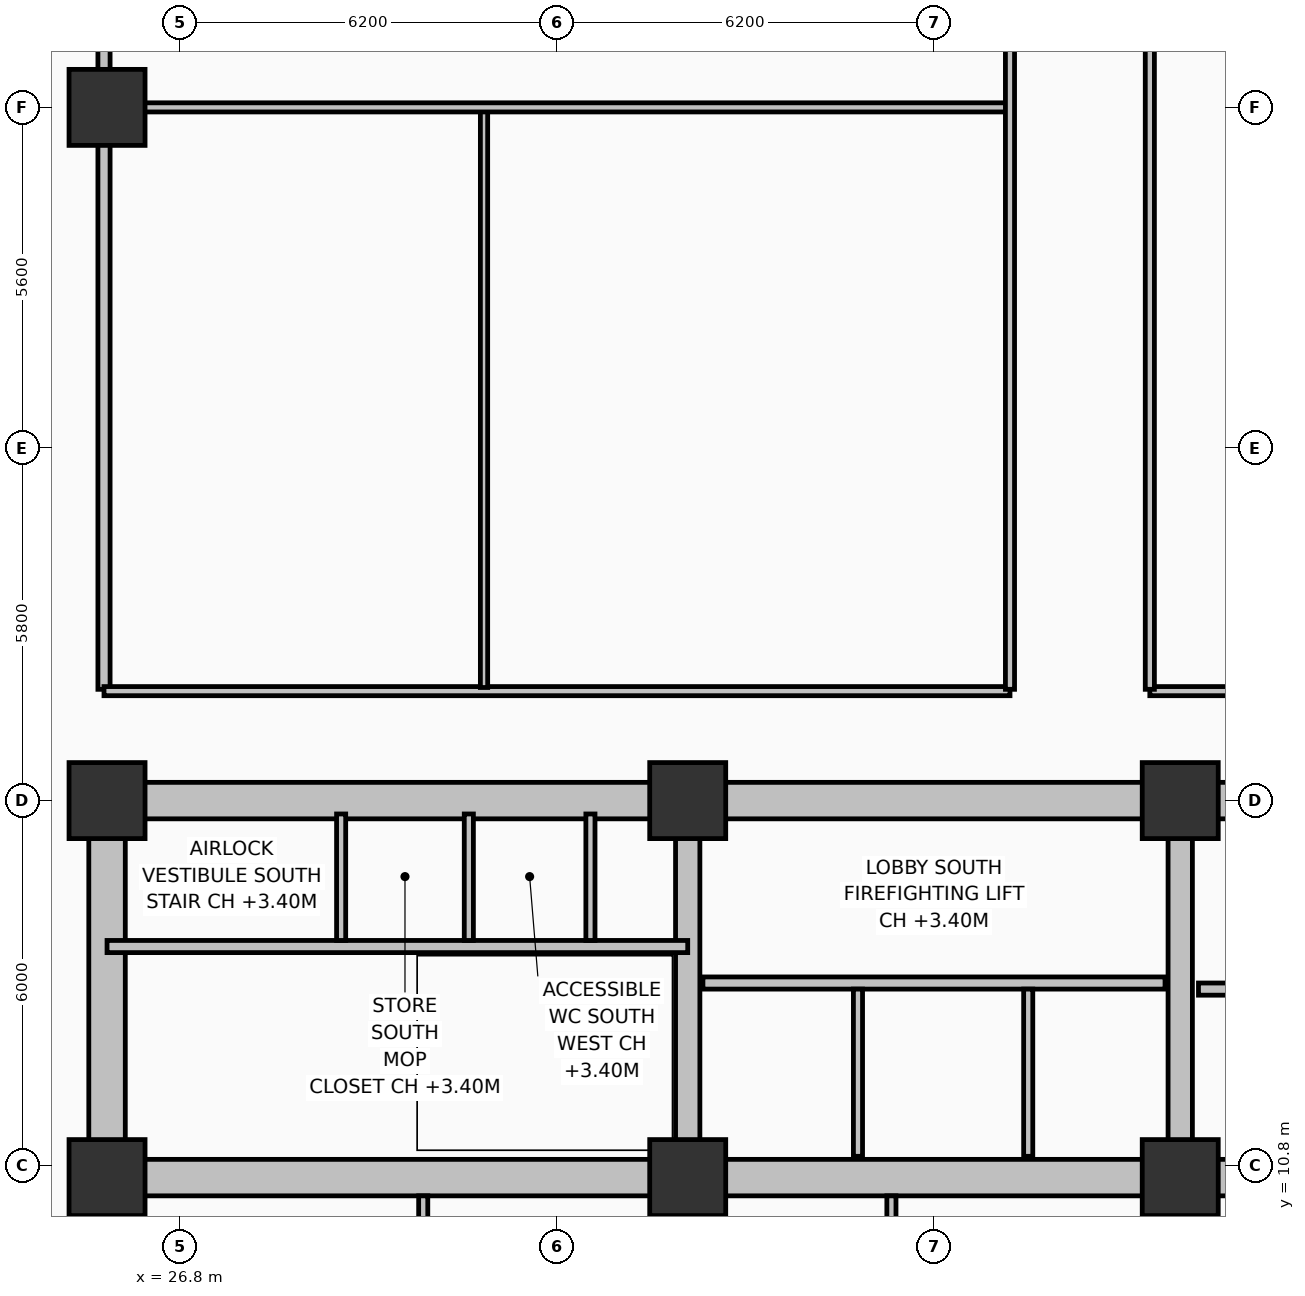
"""IFC4 building model, lengths in metres.
Left out: names, types, materials, properties, quantities, classifications, styles, units other than length and angle.
Written with IfcOpenShell. Run it as: python <this file> out.ifc"""

import sys

from ifc_helpers import new_model, si_unit, direction, frame, frame_2d, origin, origin_2d, place, context, subcontext, project, spatial, rectangle, extrude, element, fill, save


model = new_model("IFC4")
c1 = context("Model", 3, precision=1e-05, world=origin(), true_north=direction((0.0, 1.0)))
c2 = subcontext(c1, "Body", "Model", "MODEL_VIEW")
j1 = project(units=[si_unit("LENGTHUNIT", "METRE"), si_unit("PLANEANGLEUNIT", "RADIAN")], contexts=[c1])
p1 = place(None, origin())
s1 = spatial("IfcSite", under=j1, at=p1, CompositionType="ELEMENT")
p2 = place(p1, origin())
s2 = spatial("IfcBuilding", under=s1, at=p2, CompositionType="ELEMENT")
p3 = place(p2, frame((0.0, 0.0, 36.2)))
s3 = spatial("IfcBuildingStorey", under=s2, at=p3, CompositionType="ELEMENT", Elevation=36.2)
p4 = place(p3, frame((52.8, 10.6, 0.0), z_axis=(0.0, 0.0, 1.0), x_axis=(-1.0, 0.0, 0.0)))
e1 = element("IfcWall", 1, at=p4, inside=s3, PredefinedType="SHEAR", context=c2, shape_type="SweptSolid", body=[
    extrude(rectangle(XDim=27.2, YDim=0.6, at=frame_2d((13.6, 0.0))), origin(), (0.0, 0.0, 1.0), 3.7),
])
p5 = place(p3, frame((25.6, 10.9, 0.0), z_axis=(0.0, 0.0, 1.0), x_axis=(0.0, 1.0, 0.0)))
e2 = element("IfcWall", 2, at=p5, inside=s3, PredefinedType="SHEAR", context=c2, shape_type="SweptSolid", body=[
    extrude(rectangle(XDim=5.6, YDim=0.6, at=frame_2d((2.8, 0.0))), origin(), (0.0, 0.0, 1.0), 3.7),
])
p6 = place(p3, frame((25.6, 16.8, 0.0), z_axis=(0.0, 0.0, 1.0), x_axis=(1.0, 0.0, 0.0)))
e3 = element("IfcWall", 3, at=p6, inside=s3, PredefinedType="SHEAR", context=c2, shape_type="SweptSolid", body=[
    extrude(rectangle(XDim=27.2, YDim=0.6, at=frame_2d((13.6, 0.0))), origin(), (0.0, 0.0, 1.0), 3.7),
])
p7 = place(p6, frame((1.7, 0.0, 0.0)))
e4 = element("IfcOpeningElement", 4, at=p7, cuts=e3, PredefinedType="OPENING", context=c2, shape_type="SweptSolid", body=[
    extrude(rectangle(XDim=1.1, YDim=2.15, at=frame_2d((0.55, 1.075))), frame((0.0, 0.31, 0.0), z_axis=(0.0, -1.0, 0.0), x_axis=(1.0, 0.0, 0.0)), (0.0, 0.0, 1.0), 0.62),
])
p8 = place(p6, frame((4.45, 0.0, 0.0)))
e5 = element("IfcOpeningElement", 5, at=p8, cuts=e3, PredefinedType="OPENING", context=c2, shape_type="SweptSolid", body=[
    extrude(rectangle(XDim=0.85, YDim=2.1, at=frame_2d((0.425, 1.05))), frame((0.0, 0.31, 0.0), z_axis=(0.0, -1.0, 0.0), x_axis=(1.0, 0.0, 0.0)), (0.0, 0.0, 1.0), 0.62),
])
p9 = place(p6, frame((6.5, 0.0, 0.0)))
e6 = element("IfcOpeningElement", 6, at=p9, cuts=e3, PredefinedType="OPENING", context=c2, shape_type="SweptSolid", body=[
    extrude(rectangle(XDim=0.85, YDim=2.1, at=frame_2d((0.425, 1.05))), frame((0.0, 0.31, 0.0), z_axis=(0.0, -1.0, 0.0), x_axis=(1.0, 0.0, 0.0)), (0.0, 0.0, 1.0), 0.62),
])
p10 = place(p6, frame((13.0, 0.0, 0.0)))
e7 = element("IfcOpeningElement", 7, at=p10, cuts=e3, PredefinedType="OPENING", context=c2, shape_type="SweptSolid", body=[
    extrude(rectangle(XDim=1.2, YDim=2.15, at=frame_2d((0.6, 1.075))), frame((0.0, 0.31, 0.0), z_axis=(0.0, -1.0, 0.0), x_axis=(1.0, 0.0, 0.0)), (0.0, 0.0, 1.0), 0.62),
])
p11 = place(p6, frame((20.4, 0.0, 0.0)))
e8 = element("IfcOpeningElement", 8, at=p11, cuts=e3, PredefinedType="OPENING", context=c2, shape_type="SweptSolid", body=[
    extrude(rectangle(XDim=1.3, YDim=2.2, at=frame_2d((0.65, 1.1))), frame((0.0, 0.31, 0.0), z_axis=(0.0, -1.0, 0.0), x_axis=(1.0, 0.0, 0.0)), (0.0, 0.0, 1.0), 0.62),
])
p12 = place(p6, frame((24.65, 0.0, 0.0)))
e9 = element("IfcOpeningElement", 9, at=p12, cuts=e3, PredefinedType="OPENING", context=c2, shape_type="SweptSolid", body=[
    extrude(rectangle(XDim=0.85, YDim=2.1, at=frame_2d((0.425, 1.05))), frame((0.0, 0.31, 0.0), z_axis=(0.0, -1.0, 0.0), x_axis=(1.0, 0.0, 0.0)), (0.0, 0.0, 1.0), 0.62),
])
for number, where, z_axis, x_axis in (
    (10, (35.15, 10.9, 0.0), (0.0, 0.0, 1.0), (0.0, 1.0, 0.0)),
    (11, (43.25, 10.9, 0.0), (0.0, 0.0, 1.0), (0.0, 1.0, 0.0)),
):
    element("IfcWall", number, at=place(p3, frame(where, z_axis=z_axis, x_axis=x_axis)), inside=s3, PredefinedType="SHEAR", context=c2, shape_type="SweptSolid", body=[
        extrude(rectangle(XDim=5.6, YDim=0.4, at=frame_2d((2.8, 0.0))), origin(), (0.0, 0.0, 1.0), 3.7),
    ])
for number, where, z_axis, x_axis in (
    (12, (25.6, 10.6, 0.0), (0.0, 0.0, 1.0), (1.0, 0.0, 0.0)),
    (13, (25.6, 16.8, 0.0), (0.0, 0.0, 1.0), (1.0, 0.0, 0.0)),
    (14, (35.15, 10.6, 0.0), (0.0, 0.0, 1.0), (1.0, 0.0, 0.0)),
    (15, (35.15, 16.8, 0.0), (0.0, 0.0, 1.0), (1.0, 0.0, 0.0)),
    (16, (43.25, 10.6, 0.0), (0.0, 0.0, 1.0), (1.0, 0.0, 0.0)),
    (17, (43.25, 16.8, 0.0), (0.0, 0.0, 1.0), (1.0, 0.0, 0.0)),
    (18, (25.6, 28.2, 0.0), (0.0, 0.0, 1.0), (1.0, 0.0, 0.0)),
):
    element("IfcColumn", number, at=place(p3, frame(where, z_axis=z_axis, x_axis=x_axis)), inside=s3, PredefinedType="COLUMN", context=c2, shape_type="SweptSolid", body=[
        extrude(rectangle(XDim=1.25, YDim=1.25, at=origin_2d()), origin(), (0.0, 0.0, 1.0), 3.7),
    ])
p13 = place(p3, frame((25.6, 14.4, 0.0), z_axis=(0.0, 0.0, 1.0), x_axis=(1.0, 0.0, 0.0)))
e19 = element("IfcWall", 19, at=p13, inside=s3, PredefinedType="SHEAR", context=c2, shape_type="SweptSolid", body=[
    extrude(rectangle(XDim=9.55, YDim=0.2, at=frame_2d((4.775, 0.0))), origin(), (0.0, 0.0, 1.0), 3.7),
])
p14 = place(p13, frame((1.05, 0.0, 0.0)))
e20 = element("IfcOpeningElement", 20, at=p14, cuts=e19, PredefinedType="OPENING", context=c2, shape_type="SweptSolid", body=[
    extrude(rectangle(XDim=1.1, YDim=2.15, at=frame_2d((0.55, 1.075))), frame((0.0, 0.11, 0.0), z_axis=(0.0, -1.0, 0.0), x_axis=(1.0, 0.0, 0.0)), (0.0, 0.0, 1.0), 0.22),
])
for number, where, z_axis, x_axis in (
    (21, (29.45, 14.5, 0.0), (0.0, 0.0, 1.0), (0.0, 1.0, 0.0)),
    (22, (31.55, 14.5, 0.0), (0.0, 0.0, 1.0), (0.0, 1.0, 0.0)),
):
    element("IfcWall", number, at=place(p3, frame(where, z_axis=z_axis, x_axis=x_axis)), inside=s3, PredefinedType="PARTITIONING", context=c2, shape_type="SweptSolid", body=[
        extrude(rectangle(XDim=2.08, YDim=0.15, at=frame_2d((1.04, 0.0))), origin(), (0.0, 0.0, 1.0), 2.53),
    ])
p15 = place(p3, frame((33.55, 14.5, 0.0), z_axis=(0.0, 0.0, 1.0), x_axis=(0.0, 1.0, 0.0)))
e23 = element("IfcWall", 23, at=p15, inside=s3, PredefinedType="PARTITIONING", context=c2, shape_type="SweptSolid", body=[
    extrude(rectangle(XDim=2.08, YDim=0.15, at=frame_2d((1.04, 0.0))), origin(), (0.0, 0.0, 1.0), 2.53),
])
p16 = place(p15, frame((0.55, 0.0, 0.0)))
e24 = element("IfcOpeningElement", 24, at=p16, cuts=e23, PredefinedType="OPENING", context=c2, shape_type="SweptSolid", body=[
    extrude(rectangle(XDim=0.85, YDim=2.05, at=frame_2d((0.425, 1.025))), frame((0.0, 0.085, 0.0), z_axis=(0.0, -1.0, 0.0), x_axis=(1.0, 0.0, 0.0)), (0.0, 0.0, 1.0), 0.17),
])
p17 = place(p3, frame((35.4, 13.8, 0.0), z_axis=(0.0, 0.0, 1.0), x_axis=(1.0, 0.0, 0.0)))
e25 = element("IfcWall", 25, at=p17, inside=s3, PredefinedType="PARTITIONING", context=c2, shape_type="SweptSolid", body=[
    extrude(rectangle(XDim=7.6, YDim=0.2, at=frame_2d((3.8, 0.0))), origin(), (0.0, 0.0, 1.0), 2.3),
])
p18 = place(p17, frame((0.7, 0.0, 0.0)))
e26 = element("IfcOpeningElement", 26, at=p18, cuts=e25, PredefinedType="OPENING", context=c2, shape_type="SweptSolid", body=[
    extrude(rectangle(XDim=1.1, YDim=2.15, at=frame_2d((0.55, 1.075))), frame((0.0, 0.11, 0.0), z_axis=(0.0, -1.0, 0.0), x_axis=(1.0, 0.0, 0.0)), (0.0, 0.0, 1.0), 0.22),
])
p19 = place(p17, frame((3.35, 0.0, 0.0)))
e27 = element("IfcOpeningElement", 27, at=p19, cuts=e25, PredefinedType="OPENING", context=c2, shape_type="SweptSolid", body=[
    extrude(rectangle(XDim=1.2, YDim=2.15, at=frame_2d((0.6, 1.075))), frame((0.0, 0.11, 0.0), z_axis=(0.0, -1.0, 0.0), x_axis=(1.0, 0.0, 0.0)), (0.0, 0.0, 1.0), 0.22),
])
for number, where, z_axis, x_axis in (
    (28, (37.95, 10.95, 0.0), (0.0, 0.0, 1.0), (0.0, 1.0, 0.0)),
    (29, (40.75, 10.95, 0.0), (0.0, 0.0, 1.0), (0.0, 1.0, 0.0)),
):
    element("IfcWall", number, at=place(p3, frame(where, z_axis=z_axis, x_axis=x_axis)), inside=s3, PredefinedType="PARTITIONING", context=c2, shape_type="SweptSolid", body=[
        extrude(rectangle(XDim=2.75, YDim=0.15, at=frame_2d((1.375, 0.0))), origin(), (0.0, 0.0, 1.0), 2.53),
    ])
p20 = place(p3, frame((43.55, 13.7, 0.0), z_axis=(0.0, 0.0, 1.0), x_axis=(1.0, 0.0, 0.0)))
e30 = element("IfcWall", 30, at=p20, inside=s3, PredefinedType="PARTITIONING", context=c2, shape_type="SweptSolid", body=[
    extrude(rectangle(XDim=6.4, YDim=0.2, at=frame_2d((3.2, 0.0))), origin(), (0.0, 0.0, 1.0), 2.53),
])
p21 = place(p20, frame((0.7, 0.0, 0.0)))
e31 = element("IfcOpeningElement", 31, at=p21, cuts=e30, PredefinedType="OPENING", context=c2, shape_type="SweptSolid", body=[
    extrude(rectangle(XDim=1.0, YDim=2.15, at=frame_2d((0.5, 1.075))), frame((0.0, 0.11, 0.0), z_axis=(0.0, -1.0, 0.0), x_axis=(1.0, 0.0, 0.0)), (0.0, 0.0, 1.0), 0.22),
])
p22 = place(p20, frame((2.8, 0.0, 0.0)))
e32 = element("IfcOpeningElement", 32, at=p22, cuts=e30, PredefinedType="OPENING", context=c2, shape_type="SweptSolid", body=[
    extrude(rectangle(XDim=1.0, YDim=2.15, at=frame_2d((0.5, 1.075))), frame((0.0, 0.11, 0.0), z_axis=(0.0, -1.0, 0.0), x_axis=(1.0, 0.0, 0.0)), (0.0, 0.0, 1.0), 0.22),
])
p23 = place(p20, frame((4.9, 0.0, 0.0)))
e33 = element("IfcOpeningElement", 33, at=p23, cuts=e30, PredefinedType="OPENING", context=c2, shape_type="SweptSolid", body=[
    extrude(rectangle(XDim=1.0, YDim=2.15, at=frame_2d((0.5, 1.075))), frame((0.0, 0.11, 0.0), z_axis=(0.0, -1.0, 0.0), x_axis=(1.0, 0.0, 0.0)), (0.0, 0.0, 1.0), 0.22),
])
p24 = place(p3, frame((25.55, 18.63, 0.0), z_axis=(0.0, 0.0, 1.0), x_axis=(0.0, 1.0, 0.0)))
e34 = element("IfcWall", 34, at=p24, inside=s3, PredefinedType="PARTITIONING", context=c2, shape_type="SweptSolid", body=[
    extrude(rectangle(XDim=19.14, YDim=0.2, at=frame_2d((9.57, 0.0))), origin(), (0.0, 0.0, 1.0), 2.53),
])
p25 = place(p3, frame((25.55, 18.6, 0.0), z_axis=(0.0, 0.0, 1.0), x_axis=(1.0, 0.0, 0.0)))
e35 = element("IfcWall", 35, at=p25, inside=s3, PredefinedType="PARTITIONING", context=c2, shape_type="SweptSolid", body=[
    extrude(rectangle(XDim=14.9, YDim=0.15, at=frame_2d((7.45, 0.0))), origin(), (0.0, 0.0, 1.0), 2.53),
])
p26 = place(p3, frame((42.75, 18.6, 0.0), z_axis=(0.0, 0.0, 1.0), x_axis=(1.0, 0.0, 0.0)))
e36 = element("IfcWall", 36, at=p26, inside=s3, PredefinedType="PARTITIONING", context=c2, shape_type="SweptSolid", body=[
    extrude(rectangle(XDim=10.1, YDim=0.15, at=frame_2d((5.05, 0.0))), origin(), (0.0, 0.0, 1.0), 2.53),
])
p27 = place(p3, frame((31.8, 18.66, 0.0), z_axis=(0.0, 0.0, 1.0), x_axis=(0.0, 1.0, 0.0)))
e37 = element("IfcWall", 37, at=p27, inside=s3, PredefinedType="PARTITIONING", context=c2, shape_type="SweptSolid", body=[
    extrude(rectangle(XDim=9.49, YDim=0.12, at=frame_2d((4.745, 0.0))), origin(), (0.0, 0.0, 1.0), 2.53),
])
p28 = place(p27, frame((2.2, 0.0, 0.0)))
e38 = element("IfcOpeningElement", 38, at=p28, cuts=e37, PredefinedType="OPENING", context=c2, shape_type="SweptSolid", body=[
    extrude(rectangle(XDim=0.9, YDim=2.1, at=frame_2d((0.45, 1.05))), frame((0.0, 0.07, 0.0), z_axis=(0.0, -1.0, 0.0), x_axis=(1.0, 0.0, 0.0)), (0.0, 0.0, 1.0), 0.14),
])
p29 = place(p3, frame((25.6, 28.2, 0.0), z_axis=(0.0, 0.0, 1.0), x_axis=(1.0, 0.0, 0.0)))
e39 = element("IfcWall", 39, at=p29, inside=s3, PredefinedType="PARTITIONING", context=c2, shape_type="SweptSolid", body=[
    extrude(rectangle(XDim=14.87, YDim=0.15, at=frame_2d((7.435, 0.0))), origin(), (0.0, 0.0, 1.0), 2.53),
])
p30 = place(p3, frame((40.45, 18.63, 0.0), z_axis=(0.0, 0.0, 1.0), x_axis=(0.0, 1.0, 0.0)))
e40 = element("IfcWall", 40, at=p30, inside=s3, PredefinedType="PARTITIONING", context=c2, shape_type="SweptSolid", body=[
    extrude(rectangle(XDim=19.14, YDim=0.15, at=frame_2d((9.57, 0.0))), origin(), (0.0, 0.0, 1.0), 2.53),
])
p31 = place(p30, frame((2.4, 0.0, 0.0)))
e41 = element("IfcOpeningElement", 41, at=p31, cuts=e40, PredefinedType="OPENING", context=c2, shape_type="SweptSolid", body=[
    extrude(rectangle(XDim=1.0, YDim=2.15, at=frame_2d((0.5, 1.075))), frame((0.0, 0.085, 0.0), z_axis=(0.0, -1.0, 0.0), x_axis=(1.0, 0.0, 0.0)), (0.0, 0.0, 1.0), 0.17),
])
p32 = place(p30, frame((11.4, 0.0, 0.0)))
e42 = element("IfcOpeningElement", 42, at=p32, cuts=e40, PredefinedType="OPENING", context=c2, shape_type="SweptSolid", body=[
    extrude(rectangle(XDim=1.0, YDim=2.15, at=frame_2d((0.5, 1.075))), frame((0.0, 0.085, 0.0), z_axis=(0.0, -1.0, 0.0), x_axis=(1.0, 0.0, 0.0)), (0.0, 0.0, 1.0), 0.17),
])
p33 = place(p3, frame((42.75, 18.63, 0.0), z_axis=(0.0, 0.0, 1.0), x_axis=(0.0, 1.0, 0.0)))
e43 = element("IfcWall", 43, at=p33, inside=s3, PredefinedType="PARTITIONING", context=c2, shape_type="SweptSolid", body=[
    extrude(rectangle(XDim=19.14, YDim=0.15, at=frame_2d((9.57, 0.0))), origin(), (0.0, 0.0, 1.0), 2.53),
])
p34 = place(p33, frame((5.5, 0.0, 0.0)))
e44 = element("IfcOpeningElement", 44, at=p34, cuts=e43, PredefinedType="OPENING", context=c2, shape_type="SweptSolid", body=[
    extrude(rectangle(XDim=1.0, YDim=2.15, at=frame_2d((0.5, 1.075))), frame((0.0, 0.085, 0.0), z_axis=(0.0, -1.0, 0.0), x_axis=(1.0, 0.0, 0.0)), (0.0, 0.0, 1.0), 0.17),
])
p35 = place(p3, frame((30.8, 4.97, 0.0), z_axis=(0.0, 0.0, 1.0), x_axis=(0.0, 1.0, 0.0)))
e45 = element("IfcWall", 45, at=p35, inside=s3, PredefinedType="PARTITIONING", context=c2, shape_type="SweptSolid", body=[
    extrude(rectangle(XDim=5.33, YDim=0.15, at=frame_2d((2.665, 0.0))), origin(), (0.0, 0.0, 1.0), 2.53),
])
p36 = place(p35, frame((1.6, 0.0, 0.0)))
e46 = element("IfcOpeningElement", 46, at=p36, cuts=e45, PredefinedType="OPENING", context=c2, shape_type="SweptSolid", body=[
    extrude(rectangle(XDim=0.9, YDim=2.1, at=frame_2d((0.45, 1.05))), frame((0.0, 0.085, 0.0), z_axis=(0.0, -1.0, 0.0), x_axis=(1.0, 0.0, 0.0)), (0.0, 0.0, 1.0), 0.17),
])
p37 = place(p3, frame((38.5, 4.97, 0.0), z_axis=(0.0, 0.0, 1.0), x_axis=(0.0, 1.0, 0.0)))
e47 = element("IfcWall", 47, at=p37, inside=s3, PredefinedType="PARTITIONING", context=c2, shape_type="SweptSolid", body=[
    extrude(rectangle(XDim=5.33, YDim=0.15, at=frame_2d((2.665, 0.0))), origin(), (0.0, 0.0, 1.0), 2.53),
])
p38 = place(p3, frame((25.4, 5.92, 0.0), z_axis=(0.0, 0.0, 1.0), x_axis=(0.0, 1.0, 0.0)))
e48 = element("IfcWall", 48, at=p38, inside=s3, PredefinedType="PARTITIONING", context=c2, shape_type="SweptSolid", body=[
    extrude(rectangle(XDim=4.38, YDim=0.2, at=frame_2d((2.19, 0.0))), origin(), (0.0, 0.0, 1.0), 2.53),
])
p39 = place(p38, frame((0.85, 0.0, 0.0)))
e49 = element("IfcOpeningElement", 49, at=p39, cuts=e48, PredefinedType="OPENING", context=c2, shape_type="SweptSolid", body=[
    extrude(rectangle(XDim=0.9, YDim=2.1, at=frame_2d((0.45, 1.05))), frame((0.0, 0.11, 0.0), z_axis=(0.0, -1.0, 0.0), x_axis=(1.0, 0.0, 0.0)), (0.0, 0.0, 1.0), 0.22),
])
p40 = place(p14, origin())
e50 = element("IfcDoor", 50, at=p40, inside=s3, OperationType="SINGLE_SWING_LEFT", PredefinedType="DOOR", context=c2, shape_type="SweptSolid", body=[
    extrude(rectangle(XDim=1.1, YDim=2.15, at=frame_2d((0.55, 1.075))), frame((0.0, 0.025, 0.0), z_axis=(0.0, -1.0, 0.0), x_axis=(1.0, 0.0, 0.0)), (0.0, 0.0, 1.0), 0.05),
])
fill(e20, e50)
p41 = place(p16, origin())
e51 = element("IfcDoor", 51, at=p41, inside=s3, OperationType="SINGLE_SWING_RIGHT", PredefinedType="TRAPDOOR", context=c2, shape_type="SweptSolid", body=[
    extrude(rectangle(XDim=0.85, YDim=2.05, at=frame_2d((0.425, 1.025))), frame((0.0, 0.025, 0.0), z_axis=(0.0, -1.0, 0.0), x_axis=(1.0, 0.0, 0.0)), (0.0, 0.0, 1.0), 0.05),
])
fill(e24, e51)
p42 = place(p18, origin())
e52 = element("IfcDoor", 52, at=p42, inside=s3, OperationType="SLIDING_TO_LEFT", PredefinedType="DOOR", context=c2, shape_type="SweptSolid", body=[
    extrude(rectangle(XDim=1.1, YDim=2.15, at=frame_2d((0.55, 1.075))), frame((0.0, 0.025, 0.0), z_axis=(0.0, -1.0, 0.0), x_axis=(1.0, 0.0, 0.0)), (0.0, 0.0, 1.0), 0.05),
])
fill(e26, e52)
p43 = place(p19, origin())
e53 = element("IfcDoor", 53, at=p43, inside=s3, OperationType="SLIDING_TO_LEFT", PredefinedType="DOOR", context=c2, shape_type="SweptSolid", body=[
    extrude(rectangle(XDim=1.2, YDim=2.15, at=frame_2d((0.6, 1.075))), frame((0.0, 0.025, 0.0), z_axis=(0.0, -1.0, 0.0), x_axis=(1.0, 0.0, 0.0)), (0.0, 0.0, 1.0), 0.05),
])
fill(e27, e53)
p44 = place(p28, origin())
e54 = element("IfcDoor", 54, at=p44, inside=s3, OperationType="SINGLE_SWING_LEFT", PredefinedType="DOOR", context=c2, shape_type="SweptSolid", body=[
    extrude(rectangle(XDim=0.9, YDim=2.1, at=frame_2d((0.45, 1.05))), frame((0.0, 0.025, 0.0), z_axis=(0.0, -1.0, 0.0), x_axis=(1.0, 0.0, 0.0)), (0.0, 0.0, 1.0), 0.05),
])
fill(e38, e54)
p45 = place(p31, origin())
e55 = element("IfcDoor", 55, at=p45, inside=s3, OperationType="SINGLE_SWING_LEFT", PredefinedType="DOOR", context=c2, shape_type="SweptSolid", body=[
    extrude(rectangle(XDim=1.0, YDim=2.15, at=frame_2d((0.5, 1.075))), frame((0.0, 0.025, 0.0), z_axis=(0.0, -1.0, 0.0), x_axis=(1.0, 0.0, 0.0)), (0.0, 0.0, 1.0), 0.05),
])
fill(e41, e55)
p46 = place(p34, origin())
e56 = element("IfcDoor", 56, at=p46, inside=s3, OperationType="SINGLE_SWING_RIGHT", PredefinedType="DOOR", context=c2, shape_type="SweptSolid", body=[
    extrude(rectangle(XDim=1.0, YDim=2.15, at=frame_2d((0.5, 1.075))), frame((0.0, 0.025, 0.0), z_axis=(0.0, -1.0, 0.0), x_axis=(1.0, 0.0, 0.0)), (0.0, 0.0, 1.0), 0.05),
])
fill(e44, e56)
p47 = place(p7, origin())
e57 = element("IfcDoor", 57, at=p47, inside=s3, OperationType="SINGLE_SWING_RIGHT", PredefinedType="DOOR", context=c2, shape_type="SweptSolid", body=[
    extrude(rectangle(XDim=1.1, YDim=2.15, at=frame_2d((0.55, 1.075))), frame((0.0, 0.025, 0.0), z_axis=(0.0, -1.0, 0.0), x_axis=(1.0, 0.0, 0.0)), (0.0, 0.0, 1.0), 0.05),
])
fill(e4, e57)
p48 = place(p8, origin())
e58 = element("IfcDoor", 58, at=p48, inside=s3, OperationType="SINGLE_SWING_LEFT", PredefinedType="DOOR", context=c2, shape_type="SweptSolid", body=[
    extrude(rectangle(XDim=0.85, YDim=2.1, at=frame_2d((0.425, 1.05))), frame((0.0, 0.025, 0.0), z_axis=(0.0, -1.0, 0.0), x_axis=(1.0, 0.0, 0.0)), (0.0, 0.0, 1.0), 0.05),
])
fill(e5, e58)
p49 = place(p9, origin())
e59 = element("IfcDoor", 59, at=p49, inside=s3, OperationType="SINGLE_SWING_RIGHT", PredefinedType="DOOR", context=c2, shape_type="SweptSolid", body=[
    extrude(rectangle(XDim=0.85, YDim=2.1, at=frame_2d((0.425, 1.05))), frame((0.0, 0.025, 0.0), z_axis=(0.0, -1.0, 0.0), x_axis=(1.0, 0.0, 0.0)), (0.0, 0.0, 1.0), 0.05),
])
fill(e6, e59)
p50 = place(p10, origin())
e60 = element("IfcDoor", 60, at=p50, inside=s3, OperationType="SINGLE_SWING_LEFT", PredefinedType="DOOR", context=c2, shape_type="SweptSolid", body=[
    extrude(rectangle(XDim=1.2, YDim=2.15, at=frame_2d((0.6, 1.075))), frame((0.0, 0.025, 0.0), z_axis=(0.0, -1.0, 0.0), x_axis=(1.0, 0.0, 0.0)), (0.0, 0.0, 1.0), 0.05),
])
fill(e7, e60)
save(model, sys.argv[1])
